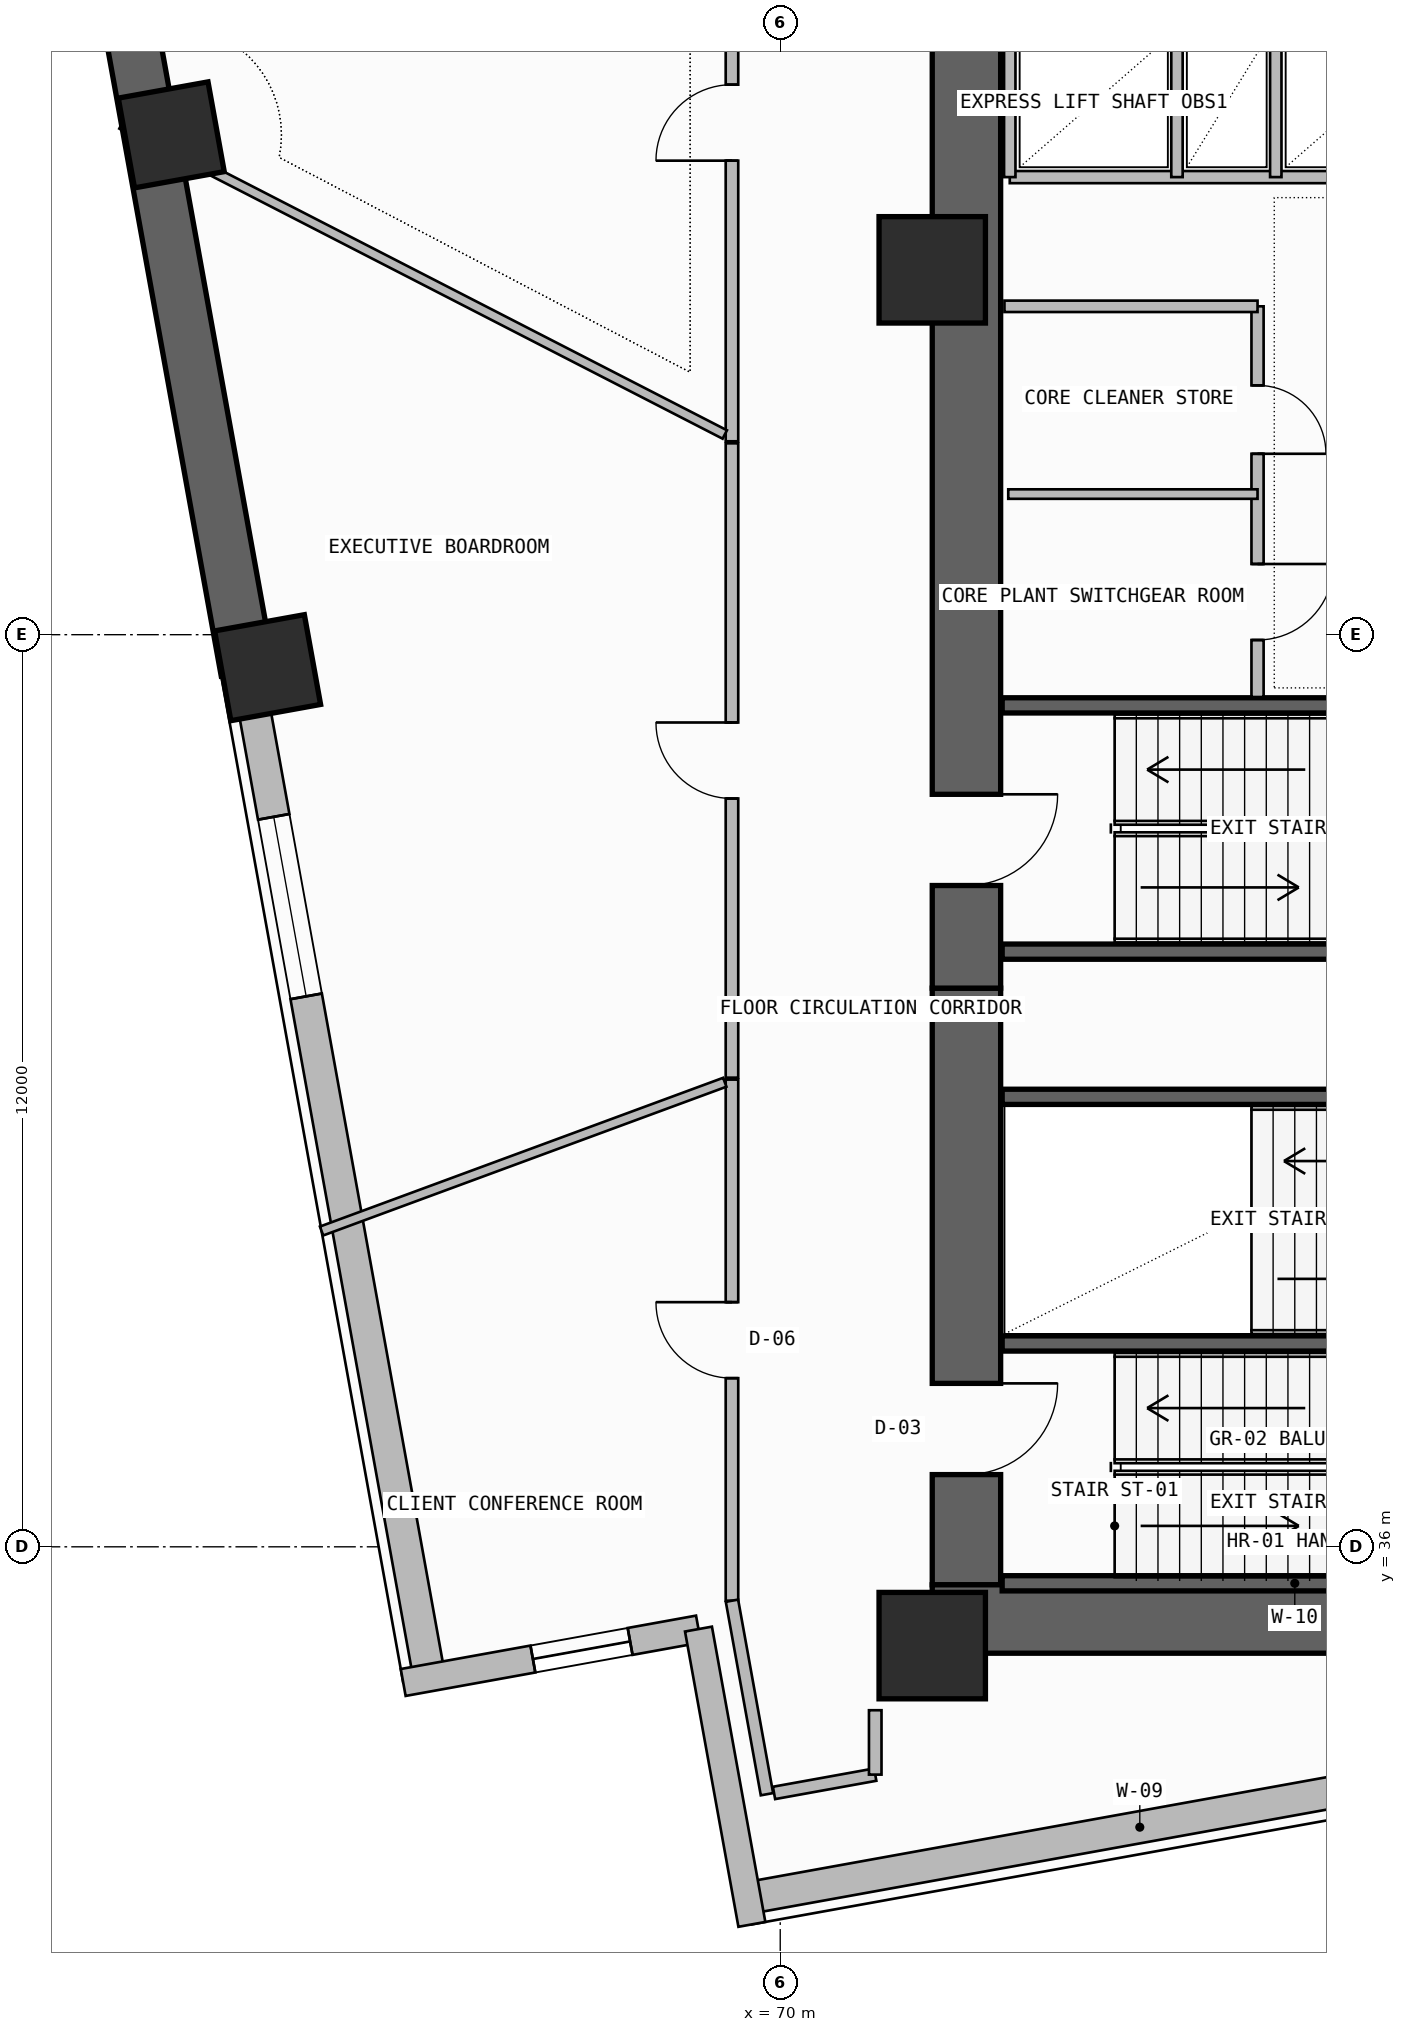
"""IFC4 building model, lengths in metres.
Left out: names, types, materials, properties, quantities, classifications, styles, units other than length and angle.
Written with IfcOpenShell. Run it as: python <this file> out.ifc"""

import sys

from ifc_helpers import new_model, si_unit, direction, frame, frame_2d, origin, origin_2d, place, context, subcontext, project, spatial, rectangle, extrude, element, fill, save


model = new_model("IFC4")
c1 = context("Model", 3, precision=1e-05, world=origin(), true_north=direction((0.0, 1.0)))
c2 = subcontext(c1, "Body", "Model", "MODEL_VIEW")
j1 = project(units=[si_unit("LENGTHUNIT", "METRE"), si_unit("PLANEANGLEUNIT", "RADIAN")], contexts=[c1])
p1 = place(None, origin())
s1 = spatial("IfcSite", under=j1, at=p1, CompositionType="ELEMENT")
p2 = place(p1, origin())
s2 = spatial("IfcBuilding", under=s1, at=p2, CompositionType="ELEMENT")
p3 = place(p2, frame((0.0, 0.0, 113.7)))
s3 = spatial("IfcBuildingStorey", under=s2, at=p3, CompositionType="ELEMENT", Elevation=113.7)
p4 = place(p3, frame((72.45, 35.5, -0.26), z_axis=(0.0, 0.0, 1.0), x_axis=(0.0, 1.0, 0.0)))
e1 = element("IfcWall", 1, at=p4, inside=s3, PredefinedType="SHEAR", context=c2, shape_type="SweptSolid", body=[
    extrude(rectangle(XDim=7.85, YDim=0.9, at=frame_2d((3.925, 0.0))), origin(), (0.0, 0.0, 1.0), 3.6),
])
p5 = place(p4, frame((1.45, 0.0, 0.26)))
e2 = element("IfcOpeningElement", 2, at=p5, cuts=e1, PredefinedType="OPENING", context=c2, shape_type="SweptSolid", body=[
    extrude(rectangle(XDim=1.2, YDim=2.2, at=frame_2d((0.6, 1.1))), frame((0.0, 0.46, 0.0), z_axis=(0.0, -1.0, 0.0), x_axis=(1.0, 0.0, 0.0)), (0.0, 0.0, 1.0), 0.92),
])
p6 = place(p3, frame((72.0, 35.05, -0.26), z_axis=(0.0, 0.0, 1.0), x_axis=(1.0, 0.0, 0.0)))
e3 = element("IfcWall", 3, at=p6, inside=s3, PredefinedType="SHEAR", context=c2, shape_type="SweptSolid", body=[
    extrude(rectangle(XDim=13.9, YDim=0.9, at=frame_2d((6.95, 0.0))), origin(), (0.0, 0.0, 1.0), 3.6),
])
p7 = place(p3, frame((72.45, 43.35, -0.26), z_axis=(0.0, 0.0, 1.0), x_axis=(0.0, 1.0, 0.0)))
e4 = element("IfcWall", 4, at=p7, inside=s3, PredefinedType="SHEAR", context=c2, shape_type="SweptSolid", body=[
    extrude(rectangle(XDim=12.7, YDim=0.9, at=frame_2d((6.35, 0.0))), origin(), (0.0, 0.0, 1.0), 3.6),
])
p8 = place(p7, frame((1.35, 0.0, 0.26)))
e5 = element("IfcOpeningElement", 5, at=p8, cuts=e4, PredefinedType="OPENING", context=c2, shape_type="SweptSolid", body=[
    extrude(rectangle(XDim=1.2, YDim=2.2, at=frame_2d((0.6, 1.1))), frame((0.0, 0.46, 0.0), z_axis=(0.0, -1.0, 0.0), x_axis=(1.0, 0.0, 0.0)), (0.0, 0.0, 1.0), 0.92),
])
for number, where, z_axis, x_axis in (
    (6, (72.0, 34.7, 0.0), (0.0, 0.0, 1.0), (1.0, 0.0, 0.0)),
    (7, (72.0, 52.8, 0.0), (0.0, 0.0, 1.0), (1.0, 0.0, 0.0)),
):
    element("IfcColumn", number, at=place(p3, frame(where, z_axis=z_axis, x_axis=x_axis)), inside=s3, PredefinedType="COLUMN", context=c2, shape_type="SweptSolid", body=[
        extrude(rectangle(XDim=1.4, YDim=1.4, at=origin_2d()), origin(), (0.0, 0.0, 1.0), 3.6),
    ])
for number, where, z_axis, x_axis in (
    (8, (61.988, 54.575, 0.0), (0.0, 0.0, 1.0), (-0.178, 0.984, 0.0)),
    (9, (63.255, 47.566, 0.0), (0.0, 0.0, 1.0), (-0.178, 0.984, 0.0)),
):
    element("IfcColumn", number, at=place(p3, frame(where, z_axis=z_axis, x_axis=x_axis)), inside=s3, PredefinedType="COLUMN", context=c2, shape_type="SweptSolid", body=[
        extrude(rectangle(XDim=1.2, YDim=1.2, at=origin_2d()), origin(), (0.0, 0.0, 1.0), 3.6),
    ])
p9 = place(p3, frame((69.565, 31.377, 0.0), z_axis=(0.0, 0.0, 1.0), x_axis=(0.98404091451, 0.177942346197, 0.0)))
e10 = element("IfcWall", 10, at=p9, inside=s3, PredefinedType="SOLIDWALL", context=c2, shape_type="SweptSolid", body=[
    extrude(rectangle(XDim=15.583, YDim=0.42, at=frame_2d((7.792, 0.0))), origin(), (0.0, 0.0, 1.0), 3.34),
])
p10 = place(p9, frame((10.5, 0.0, 1.2)))
e11 = element("IfcOpeningElement", 11, at=p10, cuts=e10, PredefinedType="OPENING", context=c2, shape_type="SweptSolid", body=[
    extrude(rectangle(XDim=2.4, YDim=0.9, at=frame_2d((1.2, 0.45))), frame((0.0, 0.22, 0.0), z_axis=(0.0, -1.0, 0.0), x_axis=(1.0, 0.0, 0.0)), (0.0, 0.0, 1.0), 0.44),
])
p11 = place(p3, frame((59.328, 67.768, -0.26), z_axis=(0.0, 0.0, 1.0), x_axis=(0.177933213615, -0.984042565895, 0.0)))
e12 = element("IfcWall", 12, at=p11, inside=s3, PredefinedType="SHEAR", context=c2, shape_type="SweptSolid", body=[
    extrude(rectangle(XDim=20.579, YDim=0.7, at=frame_2d((10.289, 0.0))), origin(), (0.0, 0.0, 1.0), 3.6),
])
p12 = place(p11, frame((9.1, 0.0, 1.2)))
e13 = element("IfcOpeningElement", 13, at=p12, cuts=e12, PredefinedType="OPENING", context=c2, shape_type="SweptSolid", body=[
    extrude(rectangle(XDim=2.4, YDim=0.9, at=frame_2d((1.2, 0.45))), frame((0.0, 0.36, 0.0), z_axis=(0.0, -1.0, 0.0), x_axis=(1.0, 0.0, 0.0)), (0.0, 0.0, 1.0), 0.72),
])
p13 = place(p3, frame((62.99, 47.518, 0.0), z_axis=(0.0, 0.0, 1.0), x_axis=(0.177948058674, -0.984039881516, 0.0)))
e14 = element("IfcWall", 14, at=p13, inside=s3, PredefinedType="SOLIDWALL", context=c2, shape_type="SweptSolid", body=[
    extrude(rectangle(XDim=13.455, YDim=0.42, at=frame_2d((6.728, 0.0))), origin(), (0.0, 0.0, 1.0), 2.725),
])
p14 = place(p13, frame((1.945, 0.0, 1.2)))
e15 = element("IfcOpeningElement", 15, at=p14, cuts=e14, PredefinedType="OPENING", context=c2, shape_type="SweptSolid", body=[
    extrude(rectangle(XDim=2.4, YDim=0.9, at=frame_2d((1.2, 0.45))), frame((0.0, 0.22, 0.0), z_axis=(0.0, -1.0, 0.0), x_axis=(1.0, 0.0, 0.0)), (0.0, 0.0, 1.0), 0.44),
])
p15 = place(p3, frame((65.039, 34.215, 0.0), z_axis=(0.0, 0.0, 1.0), x_axis=(0.984046535247, 0.177911260096, 0.0)))
e16 = element("IfcWall", 16, at=p15, inside=s3, PredefinedType="SOLIDWALL", context=c2, shape_type="SweptSolid", body=[
    extrude(rectangle(XDim=3.948, YDim=0.36, at=frame_2d((1.974, 0.0))), origin(), (0.0, 0.0, 1.0), 3.34),
])
p16 = place(p15, frame((1.734, 0.0, 0.45)))
e17 = element("IfcOpeningElement", 17, at=p16, cuts=e16, PredefinedType="OPENING", context=c2, shape_type="SweptSolid", body=[
    extrude(rectangle(XDim=1.3, YDim=2.4, at=frame_2d((0.65, 1.2))), frame((0.0, 0.19, 0.0), z_axis=(0.0, -1.0, 0.0), x_axis=(1.0, 0.0, 0.0)), (0.0, 0.0, 1.0), 0.38),
])
p17 = place(p3, frame((68.924, 34.917, 0.0), z_axis=(0.0, 0.0, 1.0), x_axis=(0.177981971326, -0.984033748346, 0.0)))
e18 = element("IfcWall", 18, at=p17, inside=s3, PredefinedType="SOLIDWALL", context=c2, shape_type="SweptSolid", body=[
    extrude(rectangle(XDim=3.948, YDim=0.36, at=frame_2d((1.974, 0.0))), origin(), (0.0, 0.0, 1.0), 3.34),
])
for number, where, z_axis, x_axis in (
    (19, (72.92, 35.52, -0.26), (0.0, 0.0, 1.0), (1.0, 0.0, 0.0)),
    (20, (72.92, 38.675, -0.26), (0.0, 0.0, 1.0), (1.0, 0.0, 0.0)),
):
    element("IfcWall", number, at=place(p3, frame(where, z_axis=z_axis, x_axis=x_axis)), inside=s3, PredefinedType="SOLIDWALL", context=c2, shape_type="SweptSolid", body=[
        extrude(rectangle(XDim=7.7, YDim=0.2, at=frame_2d((3.85, 0.0))), origin(), (0.0, 0.0, 1.0), 3.6),
    ])
p18 = place(p3, frame((72.92, 41.92, -0.26), z_axis=(0.0, 0.0, 1.0), x_axis=(1.0, 0.0, 0.0)))
e21 = element("IfcWall", 21, at=p18, inside=s3, PredefinedType="SOLIDWALL", context=c2, shape_type="SweptSolid", body=[
    extrude(rectangle(XDim=7.58, YDim=0.2, at=frame_2d((3.79, 0.0))), origin(), (0.0, 0.0, 1.0), 3.6),
])
for number, where, z_axis, x_axis in (
    (22, (72.92, 43.83, -0.26), (0.0, 0.0, 1.0), (1.0, 0.0, 0.0)),
    (23, (72.92, 47.07, -0.26), (0.0, 0.0, 1.0), (1.0, 0.0, 0.0)),
):
    element("IfcWall", number, at=place(p3, frame(where, z_axis=z_axis, x_axis=x_axis)), inside=s3, PredefinedType="SOLIDWALL", context=c2, shape_type="SweptSolid", body=[
        extrude(rectangle(XDim=7.7, YDim=0.2, at=frame_2d((3.85, 0.0))), origin(), (0.0, 0.0, 1.0), 3.6),
    ])
p19 = place(p3, frame((76.28, 47.18, 0.0), z_axis=(0.0, 0.0, 1.0), x_axis=(0.0, 1.0, 0.0)))
e24 = element("IfcWall", 24, at=p19, inside=s3, PredefinedType="SOLIDWALL", context=c2, shape_type="SweptSolid", body=[
    extrude(rectangle(XDim=5.14, YDim=0.16, at=frame_2d((2.57, 0.0))), origin(), (0.0, 0.0, 1.0), 3.34),
])
p20 = place(p19, frame((0.75, 0.0, 0.0)))
e25 = element("IfcOpeningElement", 25, at=p20, cuts=e24, PredefinedType="OPENING", context=c2, shape_type="SweptSolid", body=[
    extrude(rectangle(XDim=1.0, YDim=2.2, at=frame_2d((0.5, 1.1))), frame((0.0, 0.09, 0.0), z_axis=(0.0, -1.0, 0.0), x_axis=(1.0, 0.0, 0.0)), (0.0, 0.0, 1.0), 0.18),
])
p21 = place(p19, frame((3.2, 0.0, 0.0)))
e26 = element("IfcOpeningElement", 26, at=p21, cuts=e24, PredefinedType="OPENING", context=c2, shape_type="SweptSolid", body=[
    extrude(rectangle(XDim=0.9, YDim=2.1, at=frame_2d((0.45, 1.05))), frame((0.0, 0.09, 0.0), z_axis=(0.0, -1.0, 0.0), x_axis=(1.0, 0.0, 0.0)), (0.0, 0.0, 1.0), 0.18),
])
p22 = place(p3, frame((72.95, 52.32, 0.0), z_axis=(0.0, 0.0, 1.0), x_axis=(1.0, 0.0, 0.0)))
e27 = element("IfcWall", 27, at=p22, inside=s3, PredefinedType="SOLIDWALL", context=c2, shape_type="SweptSolid", body=[
    extrude(rectangle(XDim=3.33, YDim=0.15, at=frame_2d((1.665, 0.0))), origin(), (0.0, 0.0, 1.0), 3.34),
])
p23 = place(p3, frame((73.0, 49.85, 0.0), z_axis=(0.0, 0.0, 1.0), x_axis=(1.0, 0.0, 0.0)))
e28 = element("IfcWall", 28, at=p23, inside=s3, PredefinedType="PARTITIONING", context=c2, shape_type="SweptSolid", body=[
    extrude(rectangle(XDim=3.28, YDim=0.125, at=frame_2d((1.64, 0.0))), origin(), (0.0, 0.0, 1.0), 3.34),
])
p24 = place(p3, frame((73.02, 54.02, 0.0), z_axis=(0.0, 0.0, 1.0), x_axis=(1.0, 0.0, 0.0)))
e29 = element("IfcWall", 29, at=p24, inside=s3, PredefinedType="SOLIDWALL", context=c2, shape_type="SweptSolid", body=[
    extrude(rectangle(XDim=12.08, YDim=0.16, at=frame_2d((6.04, 0.0))), origin(), (0.0, 0.0, 1.0), 3.34),
])
p25 = place(p3, frame((73.02, 54.02, 0.0), z_axis=(0.0, 0.0, 1.0), x_axis=(0.0, 1.0, 0.0)))
e30 = element("IfcWall", 30, at=p25, inside=s3, PredefinedType="PLUMBINGWALL", context=c2, shape_type="SweptSolid", body=[
    extrude(rectangle(XDim=1.94, YDim=0.15, at=frame_2d((0.97, 0.0))), origin(), (0.0, 0.0, 1.0), 3.34),
])
p26 = place(p3, frame((76.52, 54.02, 0.0), z_axis=(0.0, 0.0, 1.0), x_axis=(0.0, 1.0, 0.0)))
e31 = element("IfcWall", 31, at=p26, inside=s3, PredefinedType="SOLIDWALL", context=c2, shape_type="SweptSolid", body=[
    extrude(rectangle(XDim=1.94, YDim=0.15, at=frame_2d((0.97, 0.0))), origin(), (0.0, 0.0, 1.0), 3.34),
])
p27 = place(p3, frame((75.22, 54.02, 0.0), z_axis=(0.0, 0.0, 1.0), x_axis=(0.0, 1.0, 0.0)))
e32 = element("IfcWall", 32, at=p27, inside=s3, PredefinedType="PLUMBINGWALL", context=c2, shape_type="SweptSolid", body=[
    extrude(rectangle(XDim=1.94, YDim=0.15, at=frame_2d((0.97, 0.0))), origin(), (0.0, 0.0, 1.0), 3.34),
])
p28 = place(p3, frame((69.365, 42.146, 0.0), z_axis=(0.0, 0.0, 1.0), x_axis=(0.0, -1.0, 0.0)))
e33 = element("IfcWall", 33, at=p28, inside=s3, PredefinedType="PARTITIONING", context=c2, shape_type="SweptSolid", body=[
    extrude(rectangle(XDim=6.855, YDim=0.165, at=frame_2d((3.428, 0.0))), origin(), (0.0, 0.0, 1.0), 3.34),
])
p29 = place(p28, frame((2.928, 0.0, 0.0)))
e34 = element("IfcOpeningElement", 34, at=p29, cuts=e33, PredefinedType="OPENING", context=c2, shape_type="SweptSolid", body=[
    extrude(rectangle(XDim=1.0, YDim=2.2, at=frame_2d((0.5, 1.1))), frame((0.0, 0.093, 0.0), z_axis=(0.0, -1.0, 0.0), x_axis=(1.0, 0.0, 0.0)), (0.0, 0.0, 1.0), 0.185),
])
p30 = place(p3, frame((69.365, 35.291, 0.0), z_axis=(0.0, 0.0, 1.0), x_axis=(0.177880532226, -0.984052090214, 0.0)))
e35 = element("IfcWall", 35, at=p30, inside=s3, PredefinedType="PARTITIONING", context=c2, shape_type="SweptSolid", body=[
    extrude(rectangle(XDim=2.587, YDim=0.165, at=frame_2d((1.293, 0.0))), origin(), (0.0, 0.0, 1.0), 3.34),
])
p31 = place(p3, frame((69.918, 32.762, 0.0), z_axis=(0.0, 0.0, 1.0), x_axis=(0.984022520329, 0.17804403805, 0.0)))
e36 = element("IfcWall", 36, at=p31, inside=s3, PredefinedType="PARTITIONING", context=c2, shape_type="SweptSolid", body=[
    extrude(rectangle(XDim=1.354, YDim=0.165, at=frame_2d((0.677, 0.0))), origin(), (0.0, 0.0, 1.0), 3.34),
])
p32 = place(p3, frame((71.25, 33.003, 0.0), z_axis=(0.0, 0.0, 1.0), x_axis=(0.0, 1.0, 0.0)))
e37 = element("IfcWall", 37, at=p32, inside=s3, PredefinedType="PARTITIONING", context=c2, shape_type="SweptSolid", body=[
    extrude(rectangle(XDim=0.847, YDim=0.165, at=frame_2d((0.424, 0.0))), origin(), (0.0, 0.0, 1.0), 3.34),
])
p33 = place(p3, frame((63.965, 40.155, 0.0), z_axis=(0.0, 0.0, 1.0), x_axis=(0.9382000314, 0.346093486042, 0.0)))
e38 = element("IfcWall", 38, at=p33, inside=s3, PredefinedType="PARTITIONING", context=c2, shape_type="SweptSolid", body=[
    extrude(rectangle(XDim=5.655, YDim=0.125, at=frame_2d((2.827, 0.0))), origin(), (0.0, 0.0, 1.0), 3.34),
])
p34 = place(p3, frame((69.365, 58.928, 0.0), z_axis=(0.0, 0.0, 1.0), x_axis=(0.0, -1.0, 0.0)))
e39 = element("IfcWall", 39, at=p34, inside=s3, PredefinedType="PARTITIONING", context=c2, shape_type="SweptSolid", body=[
    extrude(rectangle(XDim=8.384, YDim=0.165, at=frame_2d((4.192, 0.0))), origin(), (0.0, 0.0, 1.0), 2.725),
])
p35 = place(p34, frame((3.692, 0.0, 0.0)))
e40 = element("IfcOpeningElement", 40, at=p35, cuts=e39, PredefinedType="OPENING", context=c2, shape_type="SweptSolid", body=[
    extrude(rectangle(XDim=1.0, YDim=2.2, at=frame_2d((0.5, 1.1))), frame((0.0, 0.093, 0.0), z_axis=(0.0, -1.0, 0.0), x_axis=(1.0, 0.0, 0.0)), (0.0, 0.0, 1.0), 0.185),
])
p36 = place(p3, frame((69.271, 50.634, 0.0), z_axis=(0.0, 0.0, 1.0), x_axis=(-0.889409837341, 0.457110644418, 0.0)))
e41 = element("IfcWall", 41, at=p36, inside=s3, PredefinedType="PARTITIONING", context=c2, shape_type="SweptSolid", body=[
    extrude(rectangle(XDim=8.925, YDim=0.125, at=frame_2d((4.462, 0.0))), origin(), (0.0, 0.0, 1.0), 2.725),
])
p37 = place(p3, frame((69.365, 50.518, 0.0), z_axis=(0.0, 0.0, 1.0), x_axis=(0.0, -1.0, 0.0)))
e42 = element("IfcWall", 42, at=p37, inside=s3, PredefinedType="PARTITIONING", context=c2, shape_type="SweptSolid", body=[
    extrude(rectangle(XDim=8.345, YDim=0.165, at=frame_2d((4.173, 0.0))), origin(), (0.0, 0.0, 1.0), 3.34),
])
p38 = place(p37, frame((3.673, 0.0, 0.0)))
e43 = element("IfcOpeningElement", 43, at=p38, cuts=e42, PredefinedType="OPENING", context=c2, shape_type="SweptSolid", body=[
    extrude(rectangle(XDim=1.0, YDim=2.2, at=frame_2d((0.5, 1.1))), frame((0.0, 0.093, 0.0), z_axis=(0.0, -1.0, 0.0), x_axis=(1.0, 0.0, 0.0)), (0.0, 0.0, 1.0), 0.185),
])
p39 = place(p14, origin())
e44 = element("IfcWindow", 44, at=p39, inside=s3, PartitioningType="SINGLE_PANEL", PredefinedType="WINDOW", context=c2, shape_type="SweptSolid", body=[
    extrude(rectangle(XDim=2.4, YDim=0.9, at=frame_2d((1.2, 0.45))), frame((0.0, 0.03, 0.0), z_axis=(0.0, -1.0, 0.0), x_axis=(1.0, 0.0, 0.0)), (0.0, 0.0, 1.0), 0.06),
])
fill(e15, e44)
p40 = place(p16, origin())
e45 = element("IfcWindow", 45, at=p40, inside=s3, PartitioningType="SINGLE_PANEL", PredefinedType="WINDOW", context=c2, shape_type="SweptSolid", body=[
    extrude(rectangle(XDim=1.3, YDim=2.4, at=frame_2d((0.65, 1.2))), frame((0.0, 0.03, 0.0), z_axis=(0.0, -1.0, 0.0), x_axis=(1.0, 0.0, 0.0)), (0.0, 0.0, 1.0), 0.06),
])
fill(e17, e45)
p41 = place(p5, frame((1.2, 0.0, 0.0), z_axis=(0.0, 0.0, 1.0), x_axis=(-1.0, 0.0, 0.0)))
e46 = element("IfcDoor", 46, at=p41, inside=s3, OperationType="SINGLE_SWING_LEFT", PredefinedType="USERDEFINED", context=c2, shape_type="SweptSolid", body=[
    extrude(rectangle(XDim=1.2, YDim=2.2, at=frame_2d((0.6, 1.1))), frame((0.0, 0.025, 0.0), z_axis=(0.0, -1.0, 0.0), x_axis=(1.0, 0.0, 0.0)), (0.0, 0.0, 1.0), 0.05),
])
fill(e2, e46)
p42 = place(p8, frame((1.2, 0.0, 0.0), z_axis=(0.0, 0.0, 1.0), x_axis=(-1.0, 0.0, 0.0)))
e47 = element("IfcDoor", 47, at=p42, inside=s3, OperationType="SINGLE_SWING_LEFT", PredefinedType="USERDEFINED", context=c2, shape_type="SweptSolid", body=[
    extrude(rectangle(XDim=1.2, YDim=2.2, at=frame_2d((0.6, 1.1))), frame((0.0, 0.025, 0.0), z_axis=(0.0, -1.0, 0.0), x_axis=(1.0, 0.0, 0.0)), (0.0, 0.0, 1.0), 0.05),
])
fill(e5, e47)
p43 = place(p20, frame((1.0, 0.0, 0.0), z_axis=(0.0, 0.0, 1.0), x_axis=(-1.0, 0.0, 0.0)))
e48 = element("IfcDoor", 48, at=p43, inside=s3, OperationType="SINGLE_SWING_LEFT", PredefinedType="DOOR", context=c2, shape_type="SweptSolid", body=[
    extrude(rectangle(XDim=1.0, YDim=2.2, at=frame_2d((0.5, 1.1))), frame((0.0, 0.025, 0.0), z_axis=(0.0, -1.0, 0.0), x_axis=(1.0, 0.0, 0.0)), (0.0, 0.0, 1.0), 0.05),
])
fill(e25, e48)
p44 = place(p21, frame((0.9, 0.0, 0.0), z_axis=(0.0, 0.0, 1.0), x_axis=(-1.0, 0.0, 0.0)))
e49 = element("IfcDoor", 49, at=p44, inside=s3, OperationType="SINGLE_SWING_RIGHT", PredefinedType="DOOR", context=c2, shape_type="SweptSolid", body=[
    extrude(rectangle(XDim=0.9, YDim=2.1, at=frame_2d((0.45, 1.05))), frame((0.0, 0.025, 0.0), z_axis=(0.0, -1.0, 0.0), x_axis=(1.0, 0.0, 0.0)), (0.0, 0.0, 1.0), 0.05),
])
fill(e26, e49)
p45 = place(p29, frame((1.0, 0.0, 0.0), z_axis=(0.0, 0.0, 1.0), x_axis=(-1.0, 0.0, 0.0)))
e50 = element("IfcDoor", 50, at=p45, inside=s3, OperationType="SINGLE_SWING_RIGHT", PredefinedType="DOOR", context=c2, shape_type="SweptSolid", body=[
    extrude(rectangle(XDim=1.0, YDim=2.2, at=frame_2d((0.5, 1.1))), frame((0.0, 0.025, 0.0), z_axis=(0.0, -1.0, 0.0), x_axis=(1.0, 0.0, 0.0)), (0.0, 0.0, 1.0), 0.05),
])
fill(e34, e50)
p46 = place(p35, frame((1.0, 0.0, 0.0), z_axis=(0.0, 0.0, 1.0), x_axis=(-1.0, 0.0, 0.0)))
e51 = element("IfcDoor", 51, at=p46, inside=s3, OperationType="SINGLE_SWING_LEFT", PredefinedType="DOOR", context=c2, shape_type="SweptSolid", body=[
    extrude(rectangle(XDim=1.0, YDim=2.2, at=frame_2d((0.5, 1.1))), frame((0.0, 0.025, 0.0), z_axis=(0.0, -1.0, 0.0), x_axis=(1.0, 0.0, 0.0)), (0.0, 0.0, 1.0), 0.05),
])
fill(e40, e51)
p47 = place(p38, frame((1.0, 0.0, 0.0), z_axis=(0.0, 0.0, 1.0), x_axis=(-1.0, 0.0, 0.0)))
e52 = element("IfcDoor", 52, at=p47, inside=s3, OperationType="SINGLE_SWING_RIGHT", PredefinedType="DOOR", context=c2, shape_type="SweptSolid", body=[
    extrude(rectangle(XDim=1.0, YDim=2.2, at=frame_2d((0.5, 1.1))), frame((0.0, 0.025, 0.0), z_axis=(0.0, -1.0, 0.0), x_axis=(1.0, 0.0, 0.0)), (0.0, 0.0, 1.0), 0.05),
])
fill(e43, e52)
save(model, sys.argv[1])
